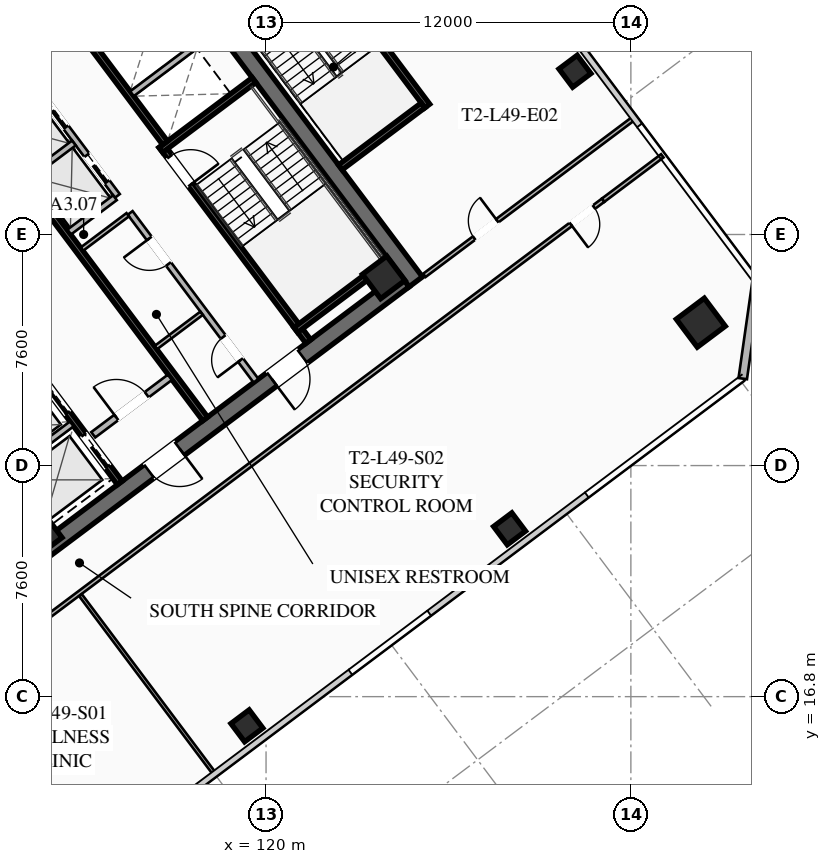
"""IFC4 building model, lengths in metres.
Left out: names, types, materials, properties, quantities, classifications, styles, units other than length and angle.
Written with IfcOpenShell. Run it as: python <this file> out.ifc"""

import sys

from ifc_helpers import new_model, si_unit, direction, frame, frame_2d, origin, origin_2d, place, context, subcontext, project, spatial, rectangle, hollow_rectangle, extrude, element, fill, save


model = new_model("IFC4")
c1 = context("Model", 3, precision=1e-05, world=origin(), true_north=direction((0.0, 1.0)))
c2 = subcontext(c1, "Body", "Model", "MODEL_VIEW")
j1 = project(units=[si_unit("LENGTHUNIT", "METRE"), si_unit("PLANEANGLEUNIT", "RADIAN")], contexts=[c1])
p1 = place(None, origin())
s1 = spatial("IfcSite", under=j1, at=p1, CompositionType="ELEMENT")
p2 = place(p1, origin())
s2 = spatial("IfcBuilding", under=s1, at=p2, CompositionType="ELEMENT")
p3 = place(p2, frame((0.0, 0.0, 181.85)))
s3 = spatial("IfcBuildingStorey", under=s2, at=p3, CompositionType="ELEMENT", Elevation=181.85)
p4 = place(p3, frame((115.564, 42.923, 0.0), z_axis=(0.0, 0.0, 1.0), x_axis=(0.600005007985, -0.799996243986, 0.0)))
e1 = element("IfcWall", 1, at=p4, inside=s3, PredefinedType="SHEAR", context=c2, shape_type="SweptSolid", body=[
    extrude(rectangle(XDim=15.6, YDim=0.55, at=frame_2d((7.8, 0.0))), origin(), (0.0, 0.0, 1.0), 3.55),
])
p5 = place(p3, frame((124.539, 30.498, 0.0), z_axis=(0.0, 0.0, 1.0), x_axis=(-0.799998054672, -0.600002593761, 0.0)))
e2 = element("IfcWall", 2, at=p5, inside=s3, PredefinedType="SHEAR", context=c2, shape_type="SweptSolid", body=[
    extrude(rectangle(XDim=15.06, YDim=0.55, at=frame_2d((7.53, 0.0))), origin(), (0.0, 0.0, 1.0), 3.55),
])
p6 = place(p5, frame((9.23, 0.0, 0.0)))
e3 = element("IfcOpeningElement", 3, at=p6, cuts=e2, PredefinedType="OPENING", context=c2, shape_type="SweptSolid", body=[
    extrude(rectangle(XDim=1.25, YDim=2.25, at=frame_2d((0.625, 1.125))), frame((0.0, 0.285, 0.0), z_axis=(0.0, -1.0, 0.0), x_axis=(1.0, 0.0, 0.0)), (0.0, 0.0, 1.0), 0.57),
])
p7 = place(p5, frame((4.18, 0.0, 0.0)))
e4 = element("IfcOpeningElement", 4, at=p7, cuts=e2, PredefinedType="OPENING", context=c2, shape_type="SweptSolid", body=[
    extrude(rectangle(XDim=1.25, YDim=2.25, at=frame_2d((0.625, 1.125))), frame((0.0, 0.285, 0.0), z_axis=(0.0, -1.0, 0.0), x_axis=(1.0, 0.0, 0.0)), (0.0, 0.0, 1.0), 0.57),
])
p8 = place(p3, frame((103.461, 33.502, 0.0), z_axis=(0.0, 0.0, 1.0), x_axis=(0.799998054672, 0.600002593761, 0.0)))
e5 = element("IfcWall", 5, at=p8, inside=s3, PredefinedType="SHEAR", context=c2, shape_type="SweptSolid", body=[
    extrude(rectangle(XDim=15.06, YDim=0.55, at=frame_2d((7.53, 0.0))), origin(), (0.0, 0.0, 1.0), 3.55),
])
p9 = place(p8, frame((4.58, 0.0, 0.0)))
e6 = element("IfcOpeningElement", 6, at=p9, cuts=e5, PredefinedType="OPENING", context=c2, shape_type="SweptSolid", body=[
    extrude(rectangle(XDim=1.25, YDim=2.25, at=frame_2d((0.625, 1.125))), frame((0.0, 0.285, 0.0), z_axis=(0.0, -1.0, 0.0), x_axis=(1.0, 0.0, 0.0)), (0.0, 0.0, 1.0), 0.57),
])
p10 = place(p8, frame((9.63, 0.0, 0.0)))
e7 = element("IfcOpeningElement", 7, at=p10, cuts=e5, PredefinedType="OPENING", context=c2, shape_type="SweptSolid", body=[
    extrude(rectangle(XDim=1.25, YDim=2.25, at=frame_2d((0.625, 1.125))), frame((0.0, 0.285, 0.0), z_axis=(0.0, -1.0, 0.0), x_axis=(1.0, 0.0, 0.0)), (0.0, 0.0, 1.0), 0.57),
])
for number, where, z_axis, x_axis in (
    (8, (112.59, 22.13, 0.0), (0.0, 0.0, 1.0), (0.8, 0.6, 0.0)),
    (9, (123.87, 30.59, 0.0), (0.0, 0.0, 1.0), (0.8, 0.6, 0.0)),
):
    element("IfcColumn", number, at=place(p3, frame(where, z_axis=z_axis, x_axis=x_axis)), inside=s3, PredefinedType="COLUMN", context=c2, shape_type="SweptSolid", body=[
        extrude(hollow_rectangle(XDim=1.0, YDim=1.0, WallThickness=0.04, at=origin_2d()), origin(), (0.0, 0.0, 1.0), 3.37),
    ])
p11 = place(p3, frame((134.3, 29.1, 0.0), z_axis=(0.0, 0.0, 1.0), x_axis=(0.799999996291, 0.600000004945, 0.0)))
e10 = element("IfcColumn", 10, at=p11, inside=s3, PredefinedType="COLUMN", context=c2, shape_type="SweptSolid", body=[
    extrude(hollow_rectangle(XDim=1.15, YDim=1.15, WallThickness=0.045, at=origin_2d()), origin(), (0.0, 0.0, 1.0), 3.37),
])
for number, where, z_axis, x_axis in (
    (11, (119.37, 15.84, 0.0), (0.0, 0.0, 1.0), (0.8, 0.6, 0.0)),
    (12, (128.01, 22.32, 0.0), (0.0, 0.0, 1.0), (0.8, 0.6, 0.0)),
    (13, (130.16, 37.37, 0.0), (0.0, 0.0, 1.0), (0.8, 0.6, 0.0)),
):
    element("IfcColumn", number, at=place(p3, frame(where, z_axis=z_axis, x_axis=x_axis)), inside=s3, PredefinedType="COLUMN", context=c2, shape_type="SweptSolid", body=[
        extrude(hollow_rectangle(XDim=0.75, YDim=0.75, WallThickness=0.032, at=origin_2d()), origin(), (0.0, 0.0, 1.0), 3.37),
    ])
p12 = place(p3, frame((136.14, 30.48, 0.0), z_axis=(0.0, 0.0, 1.0), x_axis=(-0.141410847992, -0.989950994782, 0.0)))
e14 = element("IfcWall", 14, at=p12, inside=s3, PredefinedType="SOLIDWALL", context=c2, shape_type="SweptSolid", body=[
    extrude(rectangle(XDim=3.253, YDim=0.28, at=frame_2d((1.626, 0.0))), origin(), (0.0, 0.0, 1.0), 3.37),
])
p13 = place(p3, frame((116.56, 34.92, 0.0), z_axis=(0.0, 0.0, 1.0), x_axis=(0.59999029481, -0.8000072788, 0.0)))
e15 = element("IfcWall", 15, at=p13, inside=s3, PredefinedType="SHEAR", context=c2, shape_type="SweptSolid", body=[
    extrude(rectangle(XDim=8.05, YDim=0.2, at=frame_2d((4.025, 0.0))), origin(), (0.0, 0.0, 1.0), 3.37),
])
p14 = place(p13, frame((0.45, 0.0, 0.0)))
e16 = element("IfcOpeningElement", 16, at=p14, cuts=e15, PredefinedType="OPENING", context=c2, shape_type="SweptSolid", body=[
    extrude(rectangle(XDim=1.15, YDim=2.2, at=frame_2d((0.575, 1.1))), frame((0.0, 0.11, 0.0), z_axis=(0.0, -1.0, 0.0), x_axis=(1.0, 0.0, 0.0)), (0.0, 0.0, 1.0), 0.22),
])
for number, where, z_axis, x_axis in (
    (17, (116.54, 34.78, 0.0), (0.0, 0.0, 1.0), (0.8, 0.6, 0.0)),
    (18, (120.98, 28.86, 0.0), (0.0, 0.0, 1.0), (0.8, 0.6, 0.0)),
):
    element("IfcWall", number, at=place(p3, frame(where, z_axis=z_axis, x_axis=x_axis)), inside=s3, PredefinedType="SHEAR", context=c2, shape_type="SweptSolid", body=[
        extrude(rectangle(XDim=3.83, YDim=0.2, at=frame_2d((1.915, 0.0))), origin(), (0.0, 0.0, 1.0), 3.37),
    ])
p15 = place(p3, frame((117.998, 25.936, 0.0), z_axis=(0.0, 0.0, 1.0), x_axis=(-0.600002693989, 0.799997979501, 0.0)))
e19 = element("IfcWall", 19, at=p15, inside=s3, PredefinedType="SHEAR", context=c2, shape_type="SweptSolid", body=[
    extrude(rectangle(XDim=14.5, YDim=0.2, at=frame_2d((7.25, 0.0))), origin(), (0.0, 0.0, 1.0), 3.37),
])
p16 = place(p3, frame((114.316, 25.412, 0.0), z_axis=(0.0, 0.0, 1.0), x_axis=(0.800018601094, 0.59997519774, 0.0)))
e20 = element("IfcWall", 20, at=p16, inside=s3, PredefinedType="SOLIDWALL", context=c2, shape_type="SweptSolid", body=[
    extrude(rectangle(XDim=3.15, YDim=0.22, at=frame_2d((1.575, 0.0))), origin(), (0.0, 0.0, 1.0), 2.723),
])
p17 = place(p16, frame((0.95, 0.0, 0.0)))
e21 = element("IfcOpeningElement", 21, at=p17, cuts=e20, PredefinedType="OPENING", context=c2, shape_type="SweptSolid", body=[
    extrude(rectangle(XDim=1.25, YDim=2.25, at=frame_2d((0.625, 1.125))), frame((0.0, 0.12, 0.0), z_axis=(0.0, -1.0, 0.0), x_axis=(1.0, 0.0, 0.0)), (0.0, 0.0, 1.0), 0.24),
])
p18 = place(p3, frame((115.19, 23.83, 0.0), z_axis=(0.0, 0.0, 1.0), x_axis=(-0.599993943644, 0.800004542231, 0.0)))
e22 = element("IfcWall", 22, at=p18, inside=s3, PredefinedType="SHEAR", context=c2, shape_type="SweptSolid", body=[
    extrude(rectangle(XDim=6.45, YDim=0.2, at=frame_2d((3.225, 0.0))), origin(), (0.0, 0.0, 1.0), 3.37),
])
p19 = place(p18, frame((4.875, 0.0, 0.0)))
e23 = element("IfcOpeningElement", 23, at=p19, cuts=e22, PredefinedType="OPENING", context=c2, shape_type="SweptSolid", body=[
    extrude(rectangle(XDim=1.3, YDim=2.25, at=frame_2d((0.65, 1.125))), frame((0.0, 0.11, 0.0), z_axis=(0.0, -1.0, 0.0), x_axis=(1.0, 0.0, 0.0)), (0.0, 0.0, 1.0), 0.22),
])
p20 = place(p18, frame((2.875, 0.0, 0.0)))
e24 = element("IfcOpeningElement", 24, at=p20, cuts=e22, PredefinedType="OPENING", context=c2, shape_type="SweptSolid", body=[
    extrude(rectangle(XDim=1.3, YDim=2.25, at=frame_2d((0.65, 1.125))), frame((0.0, 0.11, 0.0), z_axis=(0.0, -1.0, 0.0), x_axis=(1.0, 0.0, 0.0)), (0.0, 0.0, 1.0), 0.22),
])
p21 = place(p18, frame((0.675, 0.0, 0.0)))
e25 = element("IfcOpeningElement", 25, at=p21, cuts=e22, PredefinedType="OPENING", context=c2, shape_type="SweptSolid", body=[
    extrude(rectangle(XDim=1.3, YDim=2.25, at=frame_2d((0.65, 1.125))), frame((0.0, 0.11, 0.0), z_axis=(0.0, -1.0, 0.0), x_axis=(1.0, 0.0, 0.0)), (0.0, 0.0, 1.0), 0.22),
])
p22 = place(p3, frame((110.826, 23.682, 0.0), z_axis=(0.0, 0.0, 1.0), x_axis=(0.8, 0.6, 0.0)))
e26 = element("IfcWall", 26, at=p22, inside=s3, PredefinedType="SOLIDWALL", context=c2, shape_type="SweptSolid", body=[
    extrude(rectangle(XDim=3.48, YDim=0.2, at=frame_2d((1.74, 0.0))), origin(), (0.0, 0.0, 1.0), 3.37),
])
p23 = place(p3, frame((112.81, 40.17, 0.0), z_axis=(0.0, 0.0, 1.0), x_axis=(0.599993943644, -0.800004542231, 0.0)))
e27 = element("IfcWall", 27, at=p23, inside=s3, PredefinedType="SHEAR", context=c2, shape_type="SweptSolid", body=[
    extrude(rectangle(XDim=6.45, YDim=0.2, at=frame_2d((3.225, 0.0))), origin(), (0.0, 0.0, 1.0), 3.37),
])
p24 = place(p3, frame((115.59, 36.63, 0.0), z_axis=(0.0, 0.0, 1.0), x_axis=(0.799974743577, 0.600033673754, 0.0)))
e28 = element("IfcWall", 28, at=p24, inside=s3, PredefinedType="SOLIDWALL", context=c2, shape_type="SweptSolid", body=[
    extrude(rectangle(XDim=3.48, YDim=0.2, at=frame_2d((1.74, 0.0))), origin(), (0.0, 0.0, 1.0), 3.37),
])
p25 = place(p3, frame((119.67, 27.19, 0.0), z_axis=(0.0, 0.0, 1.0), x_axis=(-0.599988677396, 0.800008491828, 0.0)))
e29 = element("IfcWall", 29, at=p25, inside=s3, PredefinedType="SOLIDWALL", context=c2, shape_type="SweptSolid", body=[
    extrude(rectangle(XDim=6.9, YDim=0.2, at=frame_2d((3.45, 0.0))), origin(), (0.0, 0.0, 1.0), 2.723),
])
p26 = place(p25, frame((0.85, 0.0, 0.0)))
e30 = element("IfcOpeningElement", 30, at=p26, cuts=e29, PredefinedType="OPENING", context=c2, shape_type="SweptSolid", body=[
    extrude(rectangle(XDim=0.95, YDim=2.05, at=frame_2d((0.475, 1.025))), frame((0.0, 0.11, 0.0), z_axis=(0.0, -1.0, 0.0), x_axis=(1.0, 0.0, 0.0)), (0.0, 0.0, 1.0), 0.22),
])
p27 = place(p25, frame((4.8, 0.0, 0.0)))
e31 = element("IfcOpeningElement", 31, at=p27, cuts=e29, PredefinedType="OPENING", context=c2, shape_type="SweptSolid", body=[
    extrude(rectangle(XDim=1.05, YDim=2.2, at=frame_2d((0.525, 1.1))), frame((0.0, 0.11, 0.0), z_axis=(0.0, -1.0, 0.0), x_axis=(1.0, 0.0, 0.0)), (0.0, 0.0, 1.0), 0.22),
])
for number, where, z_axis, x_axis in (
    (32, (113.946, 31.522, 0.0), (0.0, 0.0, 1.0), (0.8, 0.6, 0.0)),
    (33, (116.376, 28.282, 0.0), (0.0, 0.0, 1.0), (0.8, 0.6, 0.0)),
):
    element("IfcWall", number, at=place(p3, frame(where, z_axis=z_axis, x_axis=x_axis)), inside=s3, PredefinedType="PARTITIONING", context=c2, shape_type="SweptSolid", body=[
        extrude(rectangle(XDim=1.88, YDim=0.135, at=frame_2d((0.94, 0.0))), origin(), (0.0, 0.0, 1.0), 2.723),
    ])
p28 = place(p3, frame((115.11, 33.27, 0.0), z_axis=(0.0, 0.0, 1.0), x_axis=(-0.600011322243, 0.799991508192, 0.0)))
e34 = element("IfcWall", 34, at=p28, inside=s3, PredefinedType="SOLIDWALL", context=c2, shape_type="SweptSolid", body=[
    extrude(rectangle(XDim=6.9, YDim=0.2, at=frame_2d((3.45, 0.0))), origin(), (0.0, 0.0, 1.0), 3.37),
])
p29 = place(p28, frame((0.575, 0.0, 0.0)))
e35 = element("IfcOpeningElement", 35, at=p29, cuts=e34, PredefinedType="OPENING", context=c2, shape_type="SweptSolid", body=[
    extrude(rectangle(XDim=1.1, YDim=2.2, at=frame_2d((0.55, 1.1))), frame((0.0, 0.11, 0.0), z_axis=(0.0, -1.0, 0.0), x_axis=(1.0, 0.0, 0.0)), (0.0, 0.0, 1.0), 0.22),
])
p30 = place(p28, frame((2.825, 0.0, 0.0)))
e36 = element("IfcOpeningElement", 36, at=p30, cuts=e34, PredefinedType="OPENING", context=c2, shape_type="SweptSolid", body=[
    extrude(rectangle(XDim=1.1, YDim=2.2, at=frame_2d((0.55, 1.1))), frame((0.0, 0.11, 0.0), z_axis=(0.0, -1.0, 0.0), x_axis=(1.0, 0.0, 0.0)), (0.0, 0.0, 1.0), 0.22),
])
p31 = place(p28, frame((5.075, 0.0, 0.0)))
e37 = element("IfcOpeningElement", 37, at=p31, cuts=e34, PredefinedType="OPENING", context=c2, shape_type="SweptSolid", body=[
    extrude(rectangle(XDim=1.1, YDim=2.2, at=frame_2d((0.55, 1.1))), frame((0.0, 0.11, 0.0), z_axis=(0.0, -1.0, 0.0), x_axis=(1.0, 0.0, 0.0)), (0.0, 0.0, 1.0), 0.22),
])
p32 = place(p3, frame((113.526, 32.082, 0.0), z_axis=(0.0, 0.0, 1.0), x_axis=(0.800046745961, 0.599937666993, 0.0)))
e38 = element("IfcWall", 38, at=p32, inside=s3, PredefinedType="SOLIDWALL", context=c2, shape_type="SweptSolid", body=[
    extrude(rectangle(XDim=1.88, YDim=0.2, at=frame_2d((0.94, 0.0))), origin(), (0.0, 0.0, 1.0), 3.37),
])
p33 = place(p3, frame((112.176, 33.882, 0.0), z_axis=(0.0, 0.0, 1.0), x_axis=(0.8, 0.6, 0.0)))
e39 = element("IfcWall", 39, at=p33, inside=s3, PredefinedType="SOLIDWALL", context=c2, shape_type="SweptSolid", body=[
    extrude(rectangle(XDim=1.88, YDim=0.2, at=frame_2d((0.94, 0.0))), origin(), (0.0, 0.0, 1.0), 3.37),
])
p34 = place(p3, frame((125.304, 36.228, 0.0), z_axis=(0.0, 0.0, 1.0), x_axis=(-0.59998851072, 0.800008616831, 0.0)))
e40 = element("IfcWall", 40, at=p34, inside=s3, PredefinedType="SHEAR", context=c2, shape_type="SweptSolid", body=[
    extrude(rectangle(XDim=6.8, YDim=0.2, at=frame_2d((3.4, 0.0))), origin(), (0.0, 0.0, 1.0), 3.37),
])
p35 = place(p3, frame((122.444, 34.208, 0.0), z_axis=(0.0, 0.0, 1.0), x_axis=(0.79999138319, 0.600011488909, 0.0)))
e41 = element("IfcWall", 41, at=p35, inside=s3, PredefinedType="SHEAR", context=c2, shape_type="SweptSolid", body=[
    extrude(rectangle(XDim=3.4, YDim=0.2, at=frame_2d((1.7, 0.0))), origin(), (0.0, 0.0, 1.0), 3.37),
])
p36 = place(p3, frame((96.268, 31.726, 0.0), z_axis=(0.0, 0.0, 1.0), x_axis=(0.8, 0.6, 0.0)))
e42 = element("IfcWall", 42, at=p36, inside=s3, PredefinedType="PARTITIONING", context=c2, shape_type="SweptSolid", body=[
    extrude(rectangle(XDim=28.7, YDim=0.135, at=frame_2d((14.35, 0.0))), origin(), (0.0, 0.0, 1.0), 2.723),
])
p37 = place(p36, frame((0.3, 0.0, 0.0)))
e43 = element("IfcOpeningElement", 43, at=p37, cuts=e42, PredefinedType="OPENING", context=c2, shape_type="SweptSolid", body=[
    extrude(rectangle(XDim=0.95, YDim=2.05, at=frame_2d((0.475, 1.025))), frame((0.0, 0.077, 0.0), z_axis=(0.0, -1.0, 0.0), x_axis=(1.0, 0.0, 0.0)), (0.0, 0.0, 1.0), 0.155),
])
p38 = place(p36, frame((27.45, 0.0, 0.0)))
e44 = element("IfcOpeningElement", 44, at=p38, cuts=e42, PredefinedType="OPENING", context=c2, shape_type="SweptSolid", body=[
    extrude(rectangle(XDim=0.95, YDim=2.05, at=frame_2d((0.475, 1.025))), frame((0.0, 0.077, 0.0), z_axis=(0.0, -1.0, 0.0), x_axis=(1.0, 0.0, 0.0)), (0.0, 0.0, 1.0), 0.155),
])
p39 = place(p3, frame((131.09, 33.13, 0.0), z_axis=(0.0, 0.0, 1.0), x_axis=(-0.800003062365, -0.599995916825, 0.0)))
e45 = element("IfcWall", 45, at=p39, inside=s3, PredefinedType="PARTITIONING", context=c2, shape_type="SweptSolid", body=[
    extrude(rectangle(XDim=28.7, YDim=0.135, at=frame_2d((14.35, 0.0))), origin(), (0.0, 0.0, 1.0), 2.723),
])
p40 = place(p39, frame((27.37, 0.0, 0.0)))
e46 = element("IfcOpeningElement", 46, at=p40, cuts=e45, PredefinedType="OPENING", context=c2, shape_type="SweptSolid", body=[
    extrude(rectangle(XDim=0.95, YDim=2.05, at=frame_2d((0.475, 1.025))), frame((0.0, 0.077, 0.0), z_axis=(0.0, -1.0, 0.0), x_axis=(1.0, 0.0, 0.0)), (0.0, 0.0, 1.0), 0.155),
])
p41 = place(p39, frame((0.38, 0.0, 0.0)))
e47 = element("IfcOpeningElement", 47, at=p41, cuts=e45, PredefinedType="OPENING", context=c2, shape_type="SweptSolid", body=[
    extrude(rectangle(XDim=0.95, YDim=2.05, at=frame_2d((0.475, 1.025))), frame((0.0, 0.077, 0.0), z_axis=(0.0, -1.0, 0.0), x_axis=(1.0, 0.0, 0.0)), (0.0, 0.0, 1.0), 0.155),
])
p42 = place(p3, frame((131.09, 33.13, 0.0), z_axis=(0.0, 0.0, 1.0), x_axis=(0.799975885537, 0.600032151272, 0.0)))
e48 = element("IfcWall", 48, at=p42, inside=s3, PredefinedType="PARTITIONING", context=c2, shape_type="SweptSolid", body=[
    extrude(rectangle(XDim=2.43, YDim=0.135, at=frame_2d((1.215, 0.0))), origin(), (0.0, 0.0, 1.0), 2.723),
])
p43 = place(p3, frame((118.308, 14.256, 0.0), z_axis=(0.0, 0.0, 1.0), x_axis=(-0.600021258292, 0.79998405584, 0.0)))
e49 = element("IfcWall", 49, at=p43, inside=s3, PredefinedType="PARTITIONING", context=c2, shape_type="SweptSolid", body=[
    extrude(rectangle(XDim=7.35, YDim=0.11, at=frame_2d((3.675, 0.0))), origin(), (0.0, 0.0, 1.0), 2.723),
])
p44 = place(p3, frame((125.208, 30.656, 0.0), z_axis=(0.0, 0.0, 1.0), x_axis=(0.800006797429, 0.599990936654, 0.0)))
e50 = element("IfcWall", 50, at=p44, inside=s3, PredefinedType="PARTITIONING", context=c2, shape_type="SweptSolid", body=[
    extrude(rectangle(XDim=8.62, YDim=0.135, at=frame_2d((4.31, 0.0))), origin(), (0.0, 0.0, 1.0), 2.723),
])
p45 = place(p44, frame((2.045, 0.0, 0.0)))
e51 = element("IfcOpeningElement", 51, at=p45, cuts=e50, PredefinedType="OPENING", context=c2, shape_type="SweptSolid", body=[
    extrude(rectangle(XDim=0.95, YDim=2.05, at=frame_2d((0.475, 1.025))), frame((0.0, 0.077, 0.0), z_axis=(0.0, -1.0, 0.0), x_axis=(1.0, 0.0, 0.0)), (0.0, 0.0, 1.0), 0.155),
])
p46 = place(p6, origin())
e52 = element("IfcDoor", 52, at=p46, inside=s3, OperationType="SINGLE_SWING_LEFT", PredefinedType="DOOR", context=c2, shape_type="SweptSolid", body=[
    extrude(rectangle(XDim=1.25, YDim=2.25, at=frame_2d((0.625, 1.125))), frame((0.0, 0.025, 0.0), z_axis=(0.0, -1.0, 0.0), x_axis=(1.0, 0.0, 0.0)), (0.0, 0.0, 1.0), 0.05),
])
fill(e3, e52)
p47 = place(p7, origin())
e53 = element("IfcDoor", 53, at=p47, inside=s3, OperationType="SINGLE_SWING_RIGHT", PredefinedType="DOOR", context=c2, shape_type="SweptSolid", body=[
    extrude(rectangle(XDim=1.25, YDim=2.25, at=frame_2d((0.625, 1.125))), frame((0.0, 0.025, 0.0), z_axis=(0.0, -1.0, 0.0), x_axis=(1.0, 0.0, 0.0)), (0.0, 0.0, 1.0), 0.05),
])
fill(e4, e53)
p48 = place(p14, origin())
e54 = element("IfcDoor", 54, at=p48, inside=s3, OperationType="SINGLE_SWING_RIGHT", PredefinedType="DOOR", context=c2, shape_type="SweptSolid", body=[
    extrude(rectangle(XDim=1.15, YDim=2.2, at=frame_2d((0.575, 1.1))), frame((0.0, 0.025, 0.0), z_axis=(0.0, -1.0, 0.0), x_axis=(1.0, 0.0, 0.0)), (0.0, 0.0, 1.0), 0.05),
])
fill(e16, e54)
p49 = place(p17, origin())
e55 = element("IfcDoor", 55, at=p49, inside=s3, OperationType="SINGLE_SWING_LEFT", PredefinedType="DOOR", context=c2, shape_type="SweptSolid", body=[
    extrude(rectangle(XDim=1.25, YDim=2.25, at=frame_2d((0.625, 1.125))), frame((0.0, 0.025, 0.0), z_axis=(0.0, -1.0, 0.0), x_axis=(1.0, 0.0, 0.0)), (0.0, 0.0, 1.0), 0.05),
])
fill(e21, e55)
p50 = place(p26, origin())
e56 = element("IfcDoor", 56, at=p50, inside=s3, OperationType="SINGLE_SWING_LEFT", PredefinedType="DOOR", context=c2, shape_type="SweptSolid", body=[
    extrude(rectangle(XDim=0.95, YDim=2.05, at=frame_2d((0.475, 1.025))), frame((0.0, 0.025, 0.0), z_axis=(0.0, -1.0, 0.0), x_axis=(1.0, 0.0, 0.0)), (0.0, 0.0, 1.0), 0.05),
])
fill(e30, e56)
p51 = place(p27, origin())
e57 = element("IfcDoor", 57, at=p51, inside=s3, OperationType="SINGLE_SWING_RIGHT", PredefinedType="DOOR", context=c2, shape_type="SweptSolid", body=[
    extrude(rectangle(XDim=1.05, YDim=2.2, at=frame_2d((0.525, 1.1))), frame((0.0, 0.025, 0.0), z_axis=(0.0, -1.0, 0.0), x_axis=(1.0, 0.0, 0.0)), (0.0, 0.0, 1.0), 0.05),
])
fill(e31, e57)
p52 = place(p41, origin())
e58 = element("IfcDoor", 58, at=p52, inside=s3, OperationType="SINGLE_SWING_RIGHT", PredefinedType="DOOR", context=c2, shape_type="SweptSolid", body=[
    extrude(rectangle(XDim=0.95, YDim=2.05, at=frame_2d((0.475, 1.025))), frame((0.0, 0.025, 0.0), z_axis=(0.0, -1.0, 0.0), x_axis=(1.0, 0.0, 0.0)), (0.0, 0.0, 1.0), 0.05),
])
fill(e47, e58)
p53 = place(p45, origin())
e59 = element("IfcDoor", 59, at=p53, inside=s3, OperationType="SINGLE_SWING_RIGHT", PredefinedType="DOOR", context=c2, shape_type="SweptSolid", body=[
    extrude(rectangle(XDim=0.95, YDim=2.05, at=frame_2d((0.475, 1.025))), frame((0.0, 0.025, 0.0), z_axis=(0.0, -1.0, 0.0), x_axis=(1.0, 0.0, 0.0)), (0.0, 0.0, 1.0), 0.05),
])
fill(e51, e59)
p54 = place(p20, origin())
e60 = element("IfcDoor", 60, at=p54, inside=s3, OperationType="SLIDING_TO_LEFT", PredefinedType="DOOR", context=c2, shape_type="SweptSolid", body=[
    extrude(rectangle(XDim=1.3, YDim=2.25, at=frame_2d((0.65, 1.125))), frame((0.0, 0.025, 0.0), z_axis=(0.0, -1.0, 0.0), x_axis=(1.0, 0.0, 0.0)), (0.0, 0.0, 1.0), 0.05),
])
fill(e24, e60)
p55 = place(p21, origin())
e61 = element("IfcDoor", 61, at=p55, inside=s3, OperationType="SLIDING_TO_LEFT", PredefinedType="DOOR", context=c2, shape_type="SweptSolid", body=[
    extrude(rectangle(XDim=1.3, YDim=2.25, at=frame_2d((0.65, 1.125))), frame((0.0, 0.025, 0.0), z_axis=(0.0, -1.0, 0.0), x_axis=(1.0, 0.0, 0.0)), (0.0, 0.0, 1.0), 0.05),
])
fill(e25, e61)
p56 = place(p29, origin())
e62 = element("IfcDoor", 62, at=p56, inside=s3, OperationType="SLIDING_TO_LEFT", PredefinedType="DOOR", context=c2, shape_type="SweptSolid", body=[
    extrude(rectangle(XDim=1.1, YDim=2.2, at=frame_2d((0.55, 1.1))), frame((0.0, 0.025, 0.0), z_axis=(0.0, -1.0, 0.0), x_axis=(1.0, 0.0, 0.0)), (0.0, 0.0, 1.0), 0.05),
])
fill(e35, e62)
p57 = place(p30, origin())
e63 = element("IfcDoor", 63, at=p57, inside=s3, OperationType="SLIDING_TO_LEFT", PredefinedType="DOOR", context=c2, shape_type="SweptSolid", body=[
    extrude(rectangle(XDim=1.1, YDim=2.2, at=frame_2d((0.55, 1.1))), frame((0.0, 0.025, 0.0), z_axis=(0.0, -1.0, 0.0), x_axis=(1.0, 0.0, 0.0)), (0.0, 0.0, 1.0), 0.05),
])
fill(e36, e63)
save(model, sys.argv[1])
